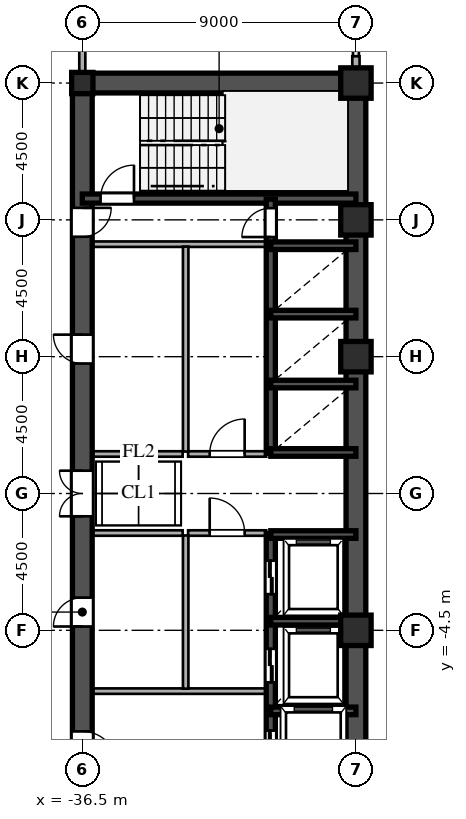
"""IFC4 building model, lengths in metres.
Left out: names, types, materials, properties, quantities, classifications, styles, units other than length and angle.
Written with IfcOpenShell. Run it as: python <this file> out.ifc"""

import sys

from ifc_helpers import new_model, si_unit, direction, frame, frame_2d, origin, origin_2d, place, context, subcontext, project, spatial, rectangle, hollow_rectangle, i_section, extrude, source, transform, mapped, element, fill, save


model = new_model("IFC4")
c1 = context("Model", 3, precision=1e-05, world=origin(), true_north=direction((0.0, 1.0)))
c2 = subcontext(c1, "Body", "Model", "MODEL_VIEW")
j1 = project(units=[si_unit("LENGTHUNIT", "METRE"), si_unit("PLANEANGLEUNIT", "RADIAN")], contexts=[c1])
p1 = place(None, origin())
s1 = spatial("IfcSite", under=j1, at=p1, CompositionType="ELEMENT")
p2 = place(p1, origin())
s2 = spatial("IfcBuilding", under=s1, at=p2, CompositionType="ELEMENT")
p3 = place(p2, frame((0.0, 0.0, 132.0)))
s3 = spatial("IfcBuildingStorey", under=s2, at=p3, CompositionType="ELEMENT", Elevation=132.0)
m1 = source(origin(), c2, "Body", "SweptSolid", [
    extrude(hollow_rectangle(XDim=1.0, YDim=1.0, WallThickness=0.042, at=origin_2d()), origin(), (0.0, 0.0, 1.0), 3.6),
])
for number, where, z_axis, x_axis in (
    (1, (-27.5, -4.5, 0.0), (0.0, 0.0, 1.0), (1.0, 0.0, 0.0)),
    (2, (-27.5, 4.5, 0.0), (0.0, 0.0, 1.0), (1.0, 0.0, 0.0)),
    (3, (-27.5, 9.0, 0.0), (0.0, 0.0, 1.0), (1.0, 0.0, 0.0)),
    (4, (-27.5, 13.5, 0.0), (0.0, 0.0, 1.0), (1.0, 0.0, 0.0)),
):
    element("IfcColumn", number, at=place(p3, frame(where, z_axis=z_axis, x_axis=x_axis)), inside=s3, PredefinedType="COLUMN", context=c2, shape_type="MappedRepresentation", body=[
        mapped(m1, transform((0.0, 0.0, 0.0), scale=1.0)),
    ])
m2 = source(origin(), c2, "Body", "SweptSolid", [
    extrude(i_section(OverallWidth=0.7, OverallDepth=0.7, WebThickness=0.028, FlangeThickness=0.045, at=origin_2d()), origin(), (0.0, 0.0, 1.0), 3.6),
])
p4 = place(p3, frame((-36.5, 13.5, 0.0), z_axis=(0.0, 0.0, 1.0), x_axis=(1.0, 0.0, 0.0)))
e5 = element("IfcColumn", 5, at=p4, inside=s3, PredefinedType="COLUMN", context=c2, shape_type="MappedRepresentation", body=[
    mapped(m2, transform((0.0, 0.0, 0.0), scale=1.0)),
])
p5 = place(p3, frame((-27.5, 13.83, 0.0), z_axis=(0.0, 0.0, 1.0), x_axis=(0.0, 1.0, 0.0)))
e6 = element("IfcWall", 6, at=p5, inside=s3, PredefinedType="SOLIDWALL", context=c2, shape_type="SweptSolid", body=[
    extrude(rectangle(XDim=0.55, YDim=0.24, at=frame_2d((0.275, 0.0))), origin(), (0.0, 0.0, 1.0), 2.79),
])
for number, where, z_axis, x_axis in (
    (7, (-27.5, -13.5, 0.0), (0.0, 0.0, 1.0), (0.0, 1.0, 0.0)),
    (8, (-27.5, 1.3, 0.0), (0.0, 0.0, 1.0), (0.0, 1.0, 0.0)),
):
    element("IfcWall", number, at=place(p3, frame(where, z_axis=z_axis, x_axis=x_axis)), inside=s3, PredefinedType="SHEAR", context=c2, shape_type="SweptSolid", body=[
        extrude(rectangle(XDim=12.2, YDim=0.65, at=frame_2d((6.1, 0.0))), origin(), (0.0, 0.0, 1.0), 3.34),
    ])
p6 = place(p3, frame((-27.5, -1.3, 0.0), z_axis=(0.0, 0.0, 1.0), x_axis=(0.0, 1.0, 0.0)))
e9 = element("IfcWall", 9, at=p6, inside=s3, PredefinedType="SHEAR", context=c2, shape_type="SweptSolid", body=[
    extrude(rectangle(XDim=2.6, YDim=0.65, at=frame_2d((1.3, 0.0))), origin(), (0.0, 0.0, 1.0), 3.34),
])
p7 = place(p3, frame((-36.5, 13.5, 0.0), z_axis=(0.0, 0.0, 1.0), x_axis=(1.0, 0.0, 0.0)))
e10 = element("IfcWall", 10, at=p7, inside=s3, PredefinedType="SHEAR", context=c2, shape_type="SweptSolid", body=[
    extrude(rectangle(XDim=9.0, YDim=0.65, at=frame_2d((4.5, 0.0))), origin(), (0.0, 0.0, 1.0), 3.34),
])
p8 = place(p3, frame((-36.5, -13.65, 0.0), z_axis=(0.0, 0.0, 1.0), x_axis=(0.0, 1.0, 0.0)))
e11 = element("IfcWall", 11, at=p8, inside=s3, PredefinedType="SHEAR", context=c2, shape_type="SweptSolid", body=[
    extrude(rectangle(XDim=7.15, YDim=0.65, at=frame_2d((3.575, 0.0))), origin(), (0.0, 0.0, 1.0), 3.34),
])
p9 = place(p8, frame((4.675, 0.0, 0.0)))
e12 = element("IfcOpeningElement", 12, at=p9, cuts=e11, PredefinedType="OPENING", context=c2, shape_type="SweptSolid", body=[
    extrude(rectangle(XDim=1.15, YDim=2.2, at=frame_2d((0.575, 1.1))), frame((0.0, 0.335, 0.0), z_axis=(0.0, -1.0, 0.0), x_axis=(1.0, 0.0, 0.0)), (0.0, 0.0, 1.0), 0.67),
])
p10 = place(p3, frame((-36.5, -1.3, 0.0), z_axis=(0.0, 0.0, 1.0), x_axis=(0.0, 1.0, 0.0)))
e13 = element("IfcWall", 13, at=p10, inside=s3, PredefinedType="SHEAR", context=c2, shape_type="SweptSolid", body=[
    extrude(rectangle(XDim=2.6, YDim=0.65, at=frame_2d((1.3, 0.0))), origin(), (0.0, 0.0, 1.0), 3.34),
])
p11 = place(p10, frame((0.55, 0.0, 0.0)))
e14 = element("IfcOpeningElement", 14, at=p11, cuts=e13, PredefinedType="OPENING", context=c2, shape_type="SweptSolid", body=[
    extrude(rectangle(XDim=1.5, YDim=2.3, at=frame_2d((0.75, 1.15))), frame((0.0, 0.335, 0.0), z_axis=(0.0, -1.0, 0.0), x_axis=(1.0, 0.0, 0.0)), (0.0, 0.0, 1.0), 0.67),
])
p12 = place(p3, frame((-36.5, 8.2, 0.0), z_axis=(0.0, 0.0, 1.0), x_axis=(0.0, 1.0, 0.0)))
e15 = element("IfcWall", 15, at=p12, inside=s3, PredefinedType="SHEAR", context=c2, shape_type="SweptSolid", body=[
    extrude(rectangle(XDim=5.45, YDim=0.65, at=frame_2d((2.725, 0.0))), origin(), (0.0, 0.0, 1.0), 3.34),
])
p13 = place(p12, frame((0.245, 0.0, 0.0)))
e16 = element("IfcOpeningElement", 16, at=p13, cuts=e15, PredefinedType="OPENING", context=c2, shape_type="SweptSolid", body=[
    extrude(rectangle(XDim=0.95, YDim=2.15, at=frame_2d((0.475, 1.075))), frame((0.0, 0.335, 0.0), z_axis=(0.0, -1.0, 0.0), x_axis=(1.0, 0.0, 0.0)), (0.0, 0.0, 1.0), 0.67),
])
p14 = place(p3, frame((-36.5, -6.5, 0.0), z_axis=(0.0, 0.0, 1.0), x_axis=(0.0, 1.0, 0.0)))
e17 = element("IfcWall", 17, at=p14, inside=s3, PredefinedType="SHEAR", context=c2, shape_type="SweptSolid", body=[
    extrude(rectangle(XDim=5.2, YDim=0.65, at=frame_2d((2.6, 0.0))), origin(), (0.0, 0.0, 1.0), 3.34),
])
p15 = place(p14, frame((2.125, 0.0, 0.0)))
e18 = element("IfcOpeningElement", 18, at=p15, cuts=e17, PredefinedType="OPENING", context=c2, shape_type="SweptSolid", body=[
    extrude(rectangle(XDim=0.95, YDim=2.15, at=frame_2d((0.475, 1.075))), frame((0.0, 0.335, 0.0), z_axis=(0.0, -1.0, 0.0), x_axis=(1.0, 0.0, 0.0)), (0.0, 0.0, 1.0), 0.67),
])
p16 = place(p3, frame((-36.5, 1.3, 0.0), z_axis=(0.0, 0.0, 1.0), x_axis=(0.0, 1.0, 0.0)))
e19 = element("IfcWall", 19, at=p16, inside=s3, PredefinedType="SHEAR", context=c2, shape_type="SweptSolid", body=[
    extrude(rectangle(XDim=6.9, YDim=0.65, at=frame_2d((3.45, 0.0))), origin(), (0.0, 0.0, 1.0), 3.34),
])
p17 = place(p16, frame((2.975, 0.0, 0.0)))
e20 = element("IfcOpeningElement", 20, at=p17, cuts=e19, PredefinedType="OPENING", context=c2, shape_type="SweptSolid", body=[
    extrude(rectangle(XDim=0.95, YDim=2.15, at=frame_2d((0.475, 1.075))), frame((0.0, 0.335, 0.0), z_axis=(0.0, -1.0, 0.0), x_axis=(1.0, 0.0, 0.0)), (0.0, 0.0, 1.0), 0.67),
])
p18 = place(p3, frame((-36.5, 9.7, 0.0), z_axis=(0.0, 0.0, 1.0), x_axis=(1.0, 0.0, 0.0)))
e21 = element("IfcWall", 21, at=p18, inside=s3, PredefinedType="SHEAR", context=c2, shape_type="SweptSolid", body=[
    extrude(rectangle(XDim=9.0, YDim=0.3, at=frame_2d((4.5, 0.0))), origin(), (0.0, 0.0, 1.0), 3.34),
])
p19 = place(p18, frame((0.6, 0.0, 0.0)))
e22 = element("IfcOpeningElement", 22, at=p19, cuts=e21, PredefinedType="OPENING", context=c2, shape_type="SweptSolid", body=[
    extrude(rectangle(XDim=1.1, YDim=2.2, at=frame_2d((0.55, 1.1))), frame((0.0, 0.16, 0.0), z_axis=(0.0, -1.0, 0.0), x_axis=(1.0, 0.0, 0.0)), (0.0, 0.0, 1.0), 0.32),
])
for number, where, z_axis, x_axis in (
    (23, (-30.3, -7.15, 0.0), (0.0, 0.0, 1.0), (1.0, 0.0, 0.0)),
    (24, (-30.3, -4.2, 0.0), (0.0, 0.0, 1.0), (1.0, 0.0, 0.0)),
    (25, (-30.3, -1.35, 0.0), (0.0, 0.0, 1.0), (1.0, 0.0, 0.0)),
    (26, (-30.3, 1.35, 0.0), (0.0, 0.0, 1.0), (1.0, 0.0, 0.0)),
    (27, (-30.3, 3.6, 0.0), (0.0, 0.0, 1.0), (1.0, 0.0, 0.0)),
    (28, (-30.3, 5.9, 0.0), (0.0, 0.0, 1.0), (1.0, 0.0, 0.0)),
    (29, (-30.3, 8.15, 0.0), (0.0, 0.0, 1.0), (1.0, 0.0, 0.0)),
):
    element("IfcWall", number, at=place(p3, frame(where, z_axis=z_axis, x_axis=x_axis)), inside=s3, PredefinedType="SHEAR", context=c2, shape_type="SweptSolid", body=[
        extrude(rectangle(XDim=2.8, YDim=0.25, at=frame_2d((1.4, 0.0))), origin(), (0.0, 0.0, 1.0), 3.34),
    ])
p20 = place(p3, frame((-30.3, -9.68, 0.0), z_axis=(0.0, 0.0, 1.0), x_axis=(0.0, 1.0, 0.0)))
e30 = element("IfcWall", 30, at=p20, inside=s3, PredefinedType="SHEAR", context=c2, shape_type="SweptSolid", body=[
    extrude(rectangle(XDim=2.56, YDim=0.3, at=frame_2d((1.28, 0.0))), origin(), (0.0, 0.0, 1.0), 3.34),
])
p21 = place(p20, frame((0.68, 0.0, 0.0)))
e31 = element("IfcOpeningElement", 31, at=p21, cuts=e30, PredefinedType="OPENING", context=c2, shape_type="SweptSolid", body=[
    extrude(rectangle(XDim=1.2, YDim=2.25, at=frame_2d((0.6, 1.125))), frame((0.0, 0.16, 0.0), z_axis=(0.0, -1.0, 0.0), x_axis=(1.0, 0.0, 0.0)), (0.0, 0.0, 1.0), 0.32),
])
p22 = place(p3, frame((-30.3, -7.12, 0.0), z_axis=(0.0, 0.0, 1.0), x_axis=(0.0, 1.0, 0.0)))
e32 = element("IfcWall", 32, at=p22, inside=s3, PredefinedType="SHEAR", context=c2, shape_type="SweptSolid", body=[
    extrude(rectangle(XDim=2.92, YDim=0.3, at=frame_2d((1.46, 0.0))), origin(), (0.0, 0.0, 1.0), 3.34),
])
p23 = place(p22, frame((0.91, 0.0, 0.0)))
e33 = element("IfcOpeningElement", 33, at=p23, cuts=e32, PredefinedType="OPENING", context=c2, shape_type="SweptSolid", body=[
    extrude(rectangle(XDim=1.1, YDim=2.2, at=frame_2d((0.55, 1.1))), frame((0.0, 0.16, 0.0), z_axis=(0.0, -1.0, 0.0), x_axis=(1.0, 0.0, 0.0)), (0.0, 0.0, 1.0), 0.32),
])
p24 = place(p3, frame((-30.3, -4.2, 0.0), z_axis=(0.0, 0.0, 1.0), x_axis=(0.0, 1.0, 0.0)))
e34 = element("IfcWall", 34, at=p24, inside=s3, PredefinedType="SHEAR", context=c2, shape_type="SweptSolid", body=[
    extrude(rectangle(XDim=2.88, YDim=0.3, at=frame_2d((1.44, 0.0))), origin(), (0.0, 0.0, 1.0), 3.34),
])
p25 = place(p24, frame((0.89, 0.0, 0.0)))
e35 = element("IfcOpeningElement", 35, at=p25, cuts=e34, PredefinedType="OPENING", context=c2, shape_type="SweptSolid", body=[
    extrude(rectangle(XDim=1.1, YDim=2.2, at=frame_2d((0.55, 1.1))), frame((0.0, 0.16, 0.0), z_axis=(0.0, -1.0, 0.0), x_axis=(1.0, 0.0, 0.0)), (0.0, 0.0, 1.0), 0.32),
])
p26 = place(p3, frame((-30.3, 1.32, 0.0), z_axis=(0.0, 0.0, 1.0), x_axis=(0.0, 1.0, 0.0)))
e36 = element("IfcWall", 36, at=p26, inside=s3, PredefinedType="SHEAR", context=c2, shape_type="SweptSolid", body=[
    extrude(rectangle(XDim=2.28, YDim=0.3, at=frame_2d((1.14, 0.0))), origin(), (0.0, 0.0, 1.0), 3.34),
])
p27 = place(p3, frame((-30.3, 3.6, 0.0), z_axis=(0.0, 0.0, 1.0), x_axis=(0.0, 1.0, 0.0)))
e37 = element("IfcWall", 37, at=p27, inside=s3, PredefinedType="SHEAR", context=c2, shape_type="SweptSolid", body=[
    extrude(rectangle(XDim=2.3, YDim=0.3, at=frame_2d((1.15, 0.0))), origin(), (0.0, 0.0, 1.0), 3.34),
])
p28 = place(p3, frame((-30.3, 5.9, 0.0), z_axis=(0.0, 0.0, 1.0), x_axis=(0.0, 1.0, 0.0)))
e38 = element("IfcWall", 38, at=p28, inside=s3, PredefinedType="SHEAR", context=c2, shape_type="SweptSolid", body=[
    extrude(rectangle(XDim=2.25, YDim=0.3, at=frame_2d((1.125, 0.0))), origin(), (0.0, 0.0, 1.0), 3.34),
])
p29 = place(p3, frame((-30.3, 8.15, 0.0), z_axis=(0.0, 0.0, 1.0), x_axis=(0.0, 1.0, 0.0)))
e39 = element("IfcWall", 39, at=p29, inside=s3, PredefinedType="SHEAR", context=c2, shape_type="SweptSolid", body=[
    extrude(rectangle(XDim=1.53, YDim=0.3, at=frame_2d((0.765, 0.0))), origin(), (0.0, 0.0, 1.0), 3.34),
])
p30 = place(p29, frame((0.285, 0.0, 0.0)))
e40 = element("IfcOpeningElement", 40, at=p30, cuts=e39, PredefinedType="OPENING", context=c2, shape_type="SweptSolid", body=[
    extrude(rectangle(XDim=0.95, YDim=2.15, at=frame_2d((0.475, 1.075))), frame((0.0, 0.16, 0.0), z_axis=(0.0, -1.0, 0.0), x_axis=(1.0, 0.0, 0.0)), (0.0, 0.0, 1.0), 0.32),
])
for number, where, z_axis, x_axis in (
    (41, (-36.15, -6.5, 0.0), (0.0, 0.0, 1.0), (1.0, 0.0, 0.0)),
    (42, (-36.15, 8.2, 0.0), (0.0, 0.0, 1.0), (1.0, 0.0, 0.0)),
):
    element("IfcWall", number, at=place(p3, frame(where, z_axis=z_axis, x_axis=x_axis)), inside=s3, PredefinedType="PARTITIONING", context=c2, shape_type="SweptSolid", body=[
        extrude(rectangle(XDim=5.7, YDim=0.18, at=frame_2d((2.85, 0.0))), origin(), (0.0, 0.0, 1.0), 3.34),
    ])
p31 = place(p3, frame((-33.1, -6.42, 0.0), z_axis=(0.0, 0.0, 1.0), x_axis=(0.0, 1.0, 0.0)))
e43 = element("IfcWall", 43, at=p31, inside=s3, PredefinedType="PARTITIONING", context=c2, shape_type="SweptSolid", body=[
    extrude(rectangle(XDim=5.04, YDim=0.18, at=frame_2d((2.52, 0.0))), origin(), (0.0, 0.0, 1.0), 3.34),
])
p32 = place(p3, frame((-33.1, 1.38, 0.0), z_axis=(0.0, 0.0, 1.0), x_axis=(0.0, 1.0, 0.0)))
e44 = element("IfcWall", 44, at=p32, inside=s3, PredefinedType="PARTITIONING", context=c2, shape_type="SweptSolid", body=[
    extrude(rectangle(XDim=6.74, YDim=0.18, at=frame_2d((3.37, 0.0))), origin(), (0.0, 0.0, 1.0), 3.34),
])
p33 = place(p3, frame((-33.02, -1.3, 0.0), z_axis=(0.0, 0.0, 1.0), x_axis=(1.0, 0.0, 0.0)))
e45 = element("IfcWall", 45, at=p33, inside=s3, PredefinedType="PARTITIONING", context=c2, shape_type="SweptSolid", body=[
    extrude(rectangle(XDim=2.57, YDim=0.18, at=frame_2d((1.285, 0.0))), origin(), (0.0, 0.0, 1.0), 3.34),
])
p34 = place(p33, frame((0.71, 0.0, 0.0)))
e46 = element("IfcOpeningElement", 46, at=p34, cuts=e45, PredefinedType="OPENING", context=c2, shape_type="SweptSolid", body=[
    extrude(rectangle(XDim=1.15, YDim=2.2, at=frame_2d((0.575, 1.1))), frame((0.0, 0.1, 0.0), z_axis=(0.0, -1.0, 0.0), x_axis=(1.0, 0.0, 0.0)), (0.0, 0.0, 1.0), 0.2),
])
p35 = place(p3, frame((-33.02, 1.3, 0.0), z_axis=(0.0, 0.0, 1.0), x_axis=(1.0, 0.0, 0.0)))
e47 = element("IfcWall", 47, at=p35, inside=s3, PredefinedType="PARTITIONING", context=c2, shape_type="SweptSolid", body=[
    extrude(rectangle(XDim=2.57, YDim=0.18, at=frame_2d((1.285, 0.0))), origin(), (0.0, 0.0, 1.0), 3.34),
])
p36 = place(p35, frame((0.71, 0.0, 0.0)))
e48 = element("IfcOpeningElement", 48, at=p36, cuts=e47, PredefinedType="OPENING", context=c2, shape_type="SweptSolid", body=[
    extrude(rectangle(XDim=1.15, YDim=2.2, at=frame_2d((0.575, 1.1))), frame((0.0, 0.1, 0.0), z_axis=(0.0, -1.0, 0.0), x_axis=(1.0, 0.0, 0.0)), (0.0, 0.0, 1.0), 0.2),
])
for number, where, z_axis, x_axis in (
    (49, (-36.15, -1.3, 0.0), (0.0, 0.0, 1.0), (1.0, 0.0, 0.0)),
    (50, (-36.15, 1.3, 0.0), (0.0, 0.0, 1.0), (1.0, 0.0, 0.0)),
):
    element("IfcWall", number, at=place(p3, frame(where, z_axis=z_axis, x_axis=x_axis)), inside=s3, PredefinedType="PARTITIONING", context=c2, shape_type="SweptSolid", body=[
        extrude(rectangle(XDim=2.95, YDim=0.18, at=frame_2d((1.475, 0.0))), origin(), (0.0, 0.0, 1.0), 3.34),
    ])
p37 = place(p3, frame((-36.5, 13.83, 0.0), z_axis=(0.0, 0.0, 1.0), x_axis=(0.0, 1.0, 0.0)))
e51 = element("IfcWall", 51, at=p37, inside=s3, PredefinedType="PARTITIONING", context=c2, shape_type="SweptSolid", body=[
    extrude(rectangle(XDim=1.685, YDim=0.2, at=frame_2d((0.842, 0.0))), origin(), (0.0, 0.0, 1.0), 2.44),
])
m3 = source(origin(), c2, "Body", "SweptSolid", [
    extrude(rectangle(XDim=1.15, YDim=2.2, at=frame_2d((0.575, 1.1))), frame((0.0, 0.025, 0.0), z_axis=(0.0, -1.0, 0.0), x_axis=(1.0, 0.0, 0.0)), (0.0, 0.0, 1.0), 0.05),
])
p38 = place(p9, frame((1.15, 0.0, 0.0), z_axis=(0.0, 0.0, 1.0), x_axis=(-1.0, 0.0, 0.0)))
e52 = element("IfcDoor", 52, at=p38, inside=s3, OperationType="SINGLE_SWING_LEFT", PredefinedType="DOOR", context=c2, shape_type="MappedRepresentation", body=[
    mapped(m3, transform((0.0, 0.0, 0.0), scale=1.0)),
])
fill(e12, e52)
m4 = source(origin(), c2, "Body", "SweptSolid", [
    extrude(rectangle(XDim=1.5, YDim=2.3, at=frame_2d((0.75, 1.15))), frame((0.0, 0.025, 0.0), z_axis=(0.0, -1.0, 0.0), x_axis=(1.0, 0.0, 0.0)), (0.0, 0.0, 1.0), 0.05),
])
p39 = place(p11, origin())
e53 = element("IfcDoor", 53, at=p39, inside=s3, OperationType="DOUBLE_SWING_LEFT", PredefinedType="DOOR", context=c2, shape_type="MappedRepresentation", body=[
    mapped(m4, transform((0.0, 0.0, 0.0), scale=1.0)),
])
fill(e14, e53)
m5 = source(origin(), c2, "Body", "SweptSolid", [
    extrude(rectangle(XDim=0.95, YDim=2.15, at=frame_2d((0.475, 1.075))), frame((0.0, 0.025, 0.0), z_axis=(0.0, -1.0, 0.0), x_axis=(1.0, 0.0, 0.0)), (0.0, 0.0, 1.0), 0.05),
])
p40 = place(p13, frame((0.95, 0.0, 0.0), z_axis=(0.0, 0.0, 1.0), x_axis=(-1.0, 0.0, 0.0)))
e54 = element("IfcDoor", 54, at=p40, inside=s3, OperationType="SINGLE_SWING_RIGHT", PredefinedType="DOOR", context=c2, shape_type="MappedRepresentation", body=[
    mapped(m5, transform((0.0, 0.0, 0.0), scale=1.0)),
])
fill(e16, e54)
p41 = place(p15, origin())
e55 = element("IfcDoor", 55, at=p41, inside=s3, OperationType="SINGLE_SWING_LEFT", PredefinedType="DOOR", context=c2, shape_type="MappedRepresentation", body=[
    mapped(m5, transform((0.0, 0.0, 0.0), scale=1.0)),
])
fill(e18, e55)
p42 = place(p17, origin())
e56 = element("IfcDoor", 56, at=p42, inside=s3, OperationType="SINGLE_SWING_RIGHT", PredefinedType="DOOR", context=c2, shape_type="MappedRepresentation", body=[
    mapped(m5, transform((0.0, 0.0, 0.0), scale=1.0)),
])
fill(e20, e56)
m6 = source(origin(), c2, "Body", "SweptSolid", [
    extrude(rectangle(XDim=1.1, YDim=2.2, at=frame_2d((0.55, 1.1))), frame((0.0, 0.025, 0.0), z_axis=(0.0, -1.0, 0.0), x_axis=(1.0, 0.0, 0.0)), (0.0, 0.0, 1.0), 0.05),
])
p43 = place(p19, origin())
e57 = element("IfcDoor", 57, at=p43, inside=s3, OperationType="SINGLE_SWING_RIGHT", PredefinedType="DOOR", context=c2, shape_type="MappedRepresentation", body=[
    mapped(m6, transform((0.0, 0.0, 0.0), scale=1.0)),
])
fill(e22, e57)
m7 = source(origin(), c2, "Body", "SweptSolid", [
    extrude(rectangle(XDim=1.2, YDim=2.25, at=frame_2d((0.6, 1.125))), frame((0.0, 0.025, 0.0), z_axis=(0.0, -1.0, 0.0), x_axis=(1.0, 0.0, 0.0)), (0.0, 0.0, 1.0), 0.05),
])
p44 = place(p21, origin())
e58 = element("IfcDoor", 58, at=p44, inside=s3, OperationType="DOUBLE_DOOR_SLIDING", PredefinedType="DOOR", context=c2, shape_type="MappedRepresentation", body=[
    mapped(m7, transform((0.0, 0.0, 0.0), scale=1.0)),
])
fill(e31, e58)
m8 = source(origin(), c2, "Body", "SweptSolid", [
    extrude(rectangle(XDim=1.1, YDim=2.2, at=frame_2d((0.55, 1.1))), frame((0.0, 0.025, 0.0), z_axis=(0.0, -1.0, 0.0), x_axis=(1.0, 0.0, 0.0)), (0.0, 0.0, 1.0), 0.05),
])
p45 = place(p23, origin())
e59 = element("IfcDoor", 59, at=p45, inside=s3, OperationType="DOUBLE_DOOR_SLIDING", PredefinedType="DOOR", context=c2, shape_type="MappedRepresentation", body=[
    mapped(m8, transform((0.0, 0.0, 0.0), scale=1.0)),
])
fill(e33, e59)
p46 = place(p25, origin())
e60 = element("IfcDoor", 60, at=p46, inside=s3, OperationType="DOUBLE_DOOR_SLIDING", PredefinedType="DOOR", context=c2, shape_type="MappedRepresentation", body=[
    mapped(m8, transform((0.0, 0.0, 0.0), scale=1.0)),
])
fill(e35, e60)
p47 = place(p30, origin())
e61 = element("IfcDoor", 61, at=p47, inside=s3, OperationType="SINGLE_SWING_LEFT", PredefinedType="DOOR", context=c2, shape_type="MappedRepresentation", body=[
    mapped(m5, transform((0.0, 0.0, 0.0), scale=1.0)),
])
fill(e40, e61)
p48 = place(p34, origin())
e62 = element("IfcDoor", 62, at=p48, inside=s3, OperationType="SINGLE_SWING_LEFT", PredefinedType="DOOR", context=c2, shape_type="MappedRepresentation", body=[
    mapped(m3, transform((0.0, 0.0, 0.0), scale=1.0)),
])
fill(e46, e62)
p49 = place(p36, origin())
e63 = element("IfcDoor", 63, at=p49, inside=s3, OperationType="SINGLE_SWING_RIGHT", PredefinedType="DOOR", context=c2, shape_type="MappedRepresentation", body=[
    mapped(m3, transform((0.0, 0.0, 0.0), scale=1.0)),
])
fill(e48, e63)
save(model, sys.argv[1])
